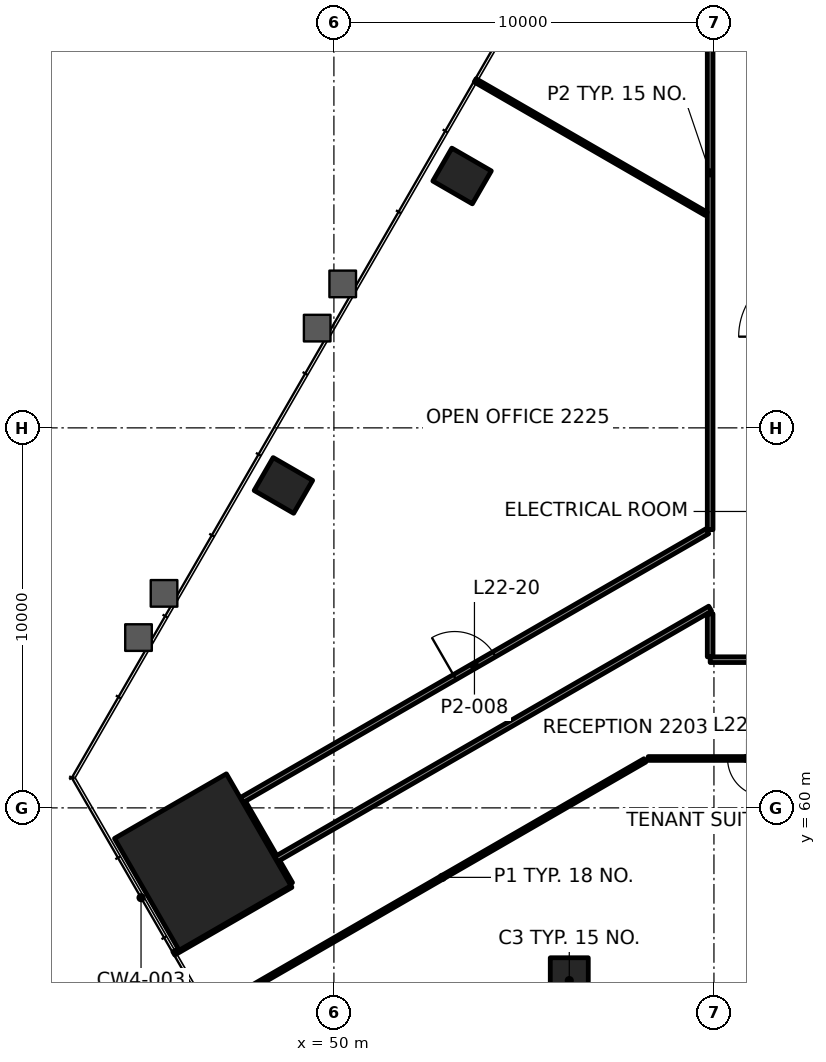
"""IFC4 building model, lengths in metres.
Left out: names, types, materials, properties, quantities, classifications, styles, units other than length and angle.
Written with IfcOpenShell. Run it as: python <this file> out.ifc"""

import sys

from ifc_helpers import new_model, si_unit, direction, frame, frame_2d, origin, origin_2d, place, context, subcontext, project, spatial, rectangle, extrude, element, fill, save


model = new_model("IFC4")
c1 = context("Model", 3, precision=1e-05, world=origin(), true_north=direction((0.0, 1.0)))
c2 = subcontext(c1, "Body", "Model", "MODEL_VIEW")
j1 = project(units=[si_unit("LENGTHUNIT", "METRE"), si_unit("PLANEANGLEUNIT", "RADIAN")], contexts=[c1])
p1 = place(None, origin())
s1 = spatial("IfcSite", under=j1, at=p1, CompositionType="ELEMENT")
p2 = place(p1, origin())
s2 = spatial("IfcBuilding", under=s1, at=p2, CompositionType="ELEMENT")
p3 = place(p2, frame((0.0, 0.0, 98.8)))
s3 = spatial("IfcBuildingStorey", under=s2, at=p3, CompositionType="ELEMENT", Elevation=98.8)
p4 = place(p3, frame((46.549, 58.574, 0.0), z_axis=(0.0, 0.0, 1.0), x_axis=(0.5, -0.866025403784, 0.0)))
e1 = element("IfcColumn", 1, at=p4, inside=s3, PredefinedType="COLUMN", context=c2, shape_type="SweptSolid", body=[
    extrude(rectangle(XDim=3.4, YDim=3.4, at=origin_2d()), origin(), (0.0, 0.0, 1.0), 4.2),
])
for number, where, z_axis, x_axis in (
    (2, (56.193, 55.456, -0.0), (0.0, 0.0, 1.0), (1.0, 0.0, 0.0)),
    (3, (53.373, 76.628, -0.0), (0.0, 0.0, 1.0), (-0.5, -0.866, 0.0)),
    (4, (48.671, 68.485, -0.0), (0.0, 0.0, 1.0), (-0.5, -0.866, 0.0)),
):
    element("IfcColumn", number, at=place(p3, frame(where, z_axis=z_axis, x_axis=x_axis)), inside=s3, PredefinedType="COLUMN", context=c2, shape_type="SweptSolid", body=[
        extrude(rectangle(XDim=1.0, YDim=1.2, at=origin_2d()), origin(), (0.0, 0.0, 1.0), 4.2),
    ])
p5 = place(p3, frame((84.403, 61.3, 0.0), z_axis=(0.0, 0.0, 1.0), x_axis=(-1.0, 0.0, 0.0)))
e5 = element("IfcWall", 5, at=p5, inside=s3, PredefinedType="PARTITIONING", context=c2, shape_type="SweptSolid", body=[
    extrude(rectangle(XDim=26.132, YDim=0.1, at=frame_2d((13.066, 0.0))), origin(), (0.0, 0.0, 1.0), 3.4),
])
p6 = place(p5, frame((2.59, 0.0, 0.0)))
e6 = element("IfcOpeningElement", 6, at=p6, cuts=e5, PredefinedType="OPENING", context=c2, shape_type="SweptSolid", body=[
    extrude(rectangle(XDim=0.9, YDim=2.1, at=frame_2d((0.45, 1.05))), frame((0.0, 0.06, 0.0), z_axis=(0.0, -1.0, 0.0), x_axis=(1.0, 0.0, 0.0)), (0.0, 0.0, 1.0), 0.12),
])
p7 = place(p5, frame((8.364, 0.0, 0.0)))
e7 = element("IfcOpeningElement", 7, at=p7, cuts=e5, PredefinedType="OPENING", context=c2, shape_type="SweptSolid", body=[
    extrude(rectangle(XDim=0.9, YDim=2.1, at=frame_2d((0.45, 1.05))), frame((0.0, 0.06, 0.0), z_axis=(0.0, -1.0, 0.0), x_axis=(1.0, 0.0, 0.0)), (0.0, 0.0, 1.0), 0.12),
])
p8 = place(p5, frame((15.956, 0.0, 0.0)))
e8 = element("IfcOpeningElement", 8, at=p8, cuts=e5, PredefinedType="OPENING", context=c2, shape_type="SweptSolid", body=[
    extrude(rectangle(XDim=1.0, YDim=2.1, at=frame_2d((0.5, 1.05))), frame((0.0, 0.06, 0.0), z_axis=(0.0, -1.0, 0.0), x_axis=(1.0, 0.0, 0.0)), (0.0, 0.0, 1.0), 0.12),
])
p9 = place(p5, frame((23.045, 0.0, 0.0)))
e9 = element("IfcOpeningElement", 9, at=p9, cuts=e5, PredefinedType="OPENING", context=c2, shape_type="SweptSolid", body=[
    extrude(rectangle(XDim=1.0, YDim=2.1, at=frame_2d((0.5, 1.05))), frame((0.0, 0.06, 0.0), z_axis=(0.0, -1.0, 0.0), x_axis=(1.0, 0.0, 0.0)), (0.0, 0.0, 1.0), 0.12),
])
p10 = place(p3, frame((90.1, 63.9, 0.0), z_axis=(0.0, 0.0, 1.0), x_axis=(-1.0, 0.0, 0.0)))
e10 = element("IfcWall", 10, at=p10, inside=s3, PredefinedType="PARTITIONING", context=c2, shape_type="SweptSolid", body=[
    extrude(rectangle(XDim=30.2, YDim=0.15, at=frame_2d((15.1, 0.0))), origin(), (0.0, 0.0, 1.0), 3.4),
])
p11 = place(p10, frame((2.35, 0.0, 0.0)))
e11 = element("IfcOpeningElement", 11, at=p11, cuts=e10, PredefinedType="OPENING", context=c2, shape_type="SweptSolid", body=[
    extrude(rectangle(XDim=1.2, YDim=2.1, at=frame_2d((0.6, 1.05))), frame((0.0, 0.085, 0.0), z_axis=(0.0, -1.0, 0.0), x_axis=(1.0, 0.0, 0.0)), (0.0, 0.0, 1.0), 0.17),
])
p12 = place(p10, frame((11.074, 0.0, 0.0)))
e12 = element("IfcOpeningElement", 12, at=p12, cuts=e10, PredefinedType="OPENING", context=c2, shape_type="SweptSolid", body=[
    extrude(rectangle(XDim=1.0, YDim=2.1, at=frame_2d((0.5, 1.05))), frame((0.0, 0.085, 0.0), z_axis=(0.0, -1.0, 0.0), x_axis=(1.0, 0.0, 0.0)), (0.0, 0.0, 1.0), 0.17),
])
p13 = place(p10, frame((21.653, 0.0, 0.0)))
e13 = element("IfcOpeningElement", 13, at=p13, cuts=e10, PredefinedType="OPENING", context=c2, shape_type="SweptSolid", body=[
    extrude(rectangle(XDim=1.0, YDim=2.1, at=frame_2d((0.5, 1.05))), frame((0.0, 0.085, 0.0), z_axis=(0.0, -1.0, 0.0), x_axis=(1.0, 0.0, 0.0)), (0.0, 0.0, 1.0), 0.17),
])
p14 = place(p10, frame((27.925, 0.0, 0.0)))
e14 = element("IfcOpeningElement", 14, at=p14, cuts=e10, PredefinedType="OPENING", context=c2, shape_type="SweptSolid", body=[
    extrude(rectangle(XDim=1.0, YDim=2.1, at=frame_2d((0.5, 1.05))), frame((0.0, 0.085, 0.0), z_axis=(0.0, -1.0, 0.0), x_axis=(1.0, 0.0, 0.0)), (0.0, 0.0, 1.0), 0.17),
])
p15 = place(p3, frame((47.519, 55.093, 0.0), z_axis=(0.0, 0.0, 1.0), x_axis=(0.866028767292, 0.499994174189, 0.0)))
e15 = element("IfcWall", 15, at=p15, inside=s3, PredefinedType="PARTITIONING", context=c2, shape_type="SweptSolid", body=[
    extrude(rectangle(XDim=12.315, YDim=0.1, at=frame_2d((6.157, 0.0))), origin(), (0.0, 0.0, 1.0), 3.4),
])
p16 = place(p3, frame((45.788, 56.171, 0.0), z_axis=(0.0, 0.0, 1.0), x_axis=(0.866031398331, 0.499989616998, 0.0)))
e16 = element("IfcWall", 16, at=p16, inside=s3, PredefinedType="PARTITIONING", context=c2, shape_type="SweptSolid", body=[
    extrude(rectangle(XDim=3.56, YDim=0.1, at=frame_2d((1.78, 0.0))), origin(), (0.0, 0.0, 1.0), 3.4),
])
p17 = place(p3, frame((48.471, 58.644, 0.0), z_axis=(0.0, 0.0, 1.0), x_axis=(0.86602138367, 0.500006962977, 0.0)))
e17 = element("IfcWall", 17, at=p17, inside=s3, PredefinedType="PARTITIONING", context=c2, shape_type="SweptSolid", body=[
    extrude(rectangle(XDim=13.197, YDim=0.15, at=frame_2d((6.599, 0.0))), origin(), (0.0, 0.0, 1.0), 3.247),
])
p18 = place(p3, frame((47.571, 60.203, 0.0), z_axis=(0.0, 0.0, 1.0), x_axis=(0.866023815059, 0.500002751744, 0.0)))
e18 = element("IfcWall", 18, at=p18, inside=s3, PredefinedType="PARTITIONING", context=c2, shape_type="SweptSolid", body=[
    extrude(rectangle(XDim=14.149, YDim=0.15, at=frame_2d((7.075, 0.0))), origin(), (0.0, 0.0, 1.0), 3.4),
])
p19 = place(p18, frame((6.475, 0.0, 0.0)))
e19 = element("IfcOpeningElement", 19, at=p19, cuts=e18, PredefinedType="OPENING", context=c2, shape_type="SweptSolid", body=[
    extrude(rectangle(XDim=1.2, YDim=2.1, at=frame_2d((0.6, 1.05))), frame((0.0, 0.085, 0.0), z_axis=(0.0, -1.0, 0.0), x_axis=(1.0, 0.0, 0.0)), (0.0, 0.0, 1.0), 0.17),
])
p20 = place(p3, frame((59.9, 63.976, 0.0), z_axis=(0.0, 0.0, 1.0), x_axis=(0.0, 1.0, 0.0)))
e20 = element("IfcWall", 20, at=p20, inside=s3, PredefinedType="PARTITIONING", context=c2, shape_type="SweptSolid", body=[
    extrude(rectangle(XDim=1.131, YDim=0.15, at=frame_2d((0.565, 0.0))), origin(), (0.0, 0.0, 1.0), 3.247),
])
p21 = place(p3, frame((59.9, 67.321, 0.0), z_axis=(0.0, 0.0, 1.0), x_axis=(0.0, 1.0, 0.0)))
e21 = element("IfcWall", 21, at=p21, inside=s3, PredefinedType="PARTITIONING", context=c2, shape_type="SweptSolid", body=[
    extrude(rectangle(XDim=18.778, YDim=0.15, at=frame_2d((9.389, 0.0))), origin(), (0.0, 0.0, 1.0), 3.4),
])
p22 = place(p3, frame((48.845, 57.995, 0.0), z_axis=(0.0, 0.0, 1.0), x_axis=(-0.499837337514, 0.866119296648, 0.0)))
e22 = element("IfcWall", 22, at=p22, inside=s3, PredefinedType="PARTITIONING", context=c2, shape_type="SweptSolid", body=[
    extrude(rectangle(XDim=0.675, YDim=0.15, at=frame_2d((0.337, 0.0))), origin(), (0.0, 0.0, 1.0), 3.4),
])
p23 = place(p3, frame((59.799, 75.632, 0.0), z_axis=(0.0, 0.0, 1.0), x_axis=(-0.866018287837, 0.500012324981, 0.0)))
e23 = element("IfcWall", 23, at=p23, inside=s3, PredefinedType="PARTITIONING", context=c2, shape_type="SweptSolid", body=[
    extrude(rectangle(XDim=7.023, YDim=0.1, at=frame_2d((3.512, 0.0))), origin(), (0.0, 0.0, 1.0), 3.165),
])
p24 = place(p3, frame((48.433, 58.709, 0.0), z_axis=(0.0, 0.0, 1.0), x_axis=(-0.500055614084, 0.865993292597, 0.0)))
e24 = element("IfcWall", 24, at=p24, inside=s3, PredefinedType="PARTITIONING", context=c2, shape_type="SweptSolid", body=[
    extrude(rectangle(XDim=1.649, YDim=0.15, at=frame_2d((0.825, 0.0))), origin(), (0.0, 0.0, 1.0), 3.247),
])
p25 = place(p9, origin())
e25 = element("IfcDoor", 25, at=p25, inside=s3, OperationType="SINGLE_SWING_RIGHT", PredefinedType="DOOR", context=c2, shape_type="SweptSolid", body=[
    extrude(rectangle(XDim=1.0, YDim=2.1, at=frame_2d((0.5, 1.05))), frame((0.0, 0.025, 0.0), z_axis=(0.0, -1.0, 0.0), x_axis=(1.0, 0.0, 0.0)), (0.0, 0.0, 1.0), 0.05),
])
fill(e9, e25)
p26 = place(p19, origin())
e26 = element("IfcDoor", 26, at=p26, inside=s3, OperationType="DOUBLE_DOOR_SINGLE_SWING", PredefinedType="DOOR", context=c2, shape_type="SweptSolid", body=[
    extrude(rectangle(XDim=1.2, YDim=2.1, at=frame_2d((0.6, 1.05))), frame((0.0, 0.025, 0.0), z_axis=(0.0, -1.0, 0.0), x_axis=(1.0, 0.0, 0.0)), (0.0, 0.0, 1.0), 0.05),
])
fill(e19, e26)
save(model, sys.argv[1])
